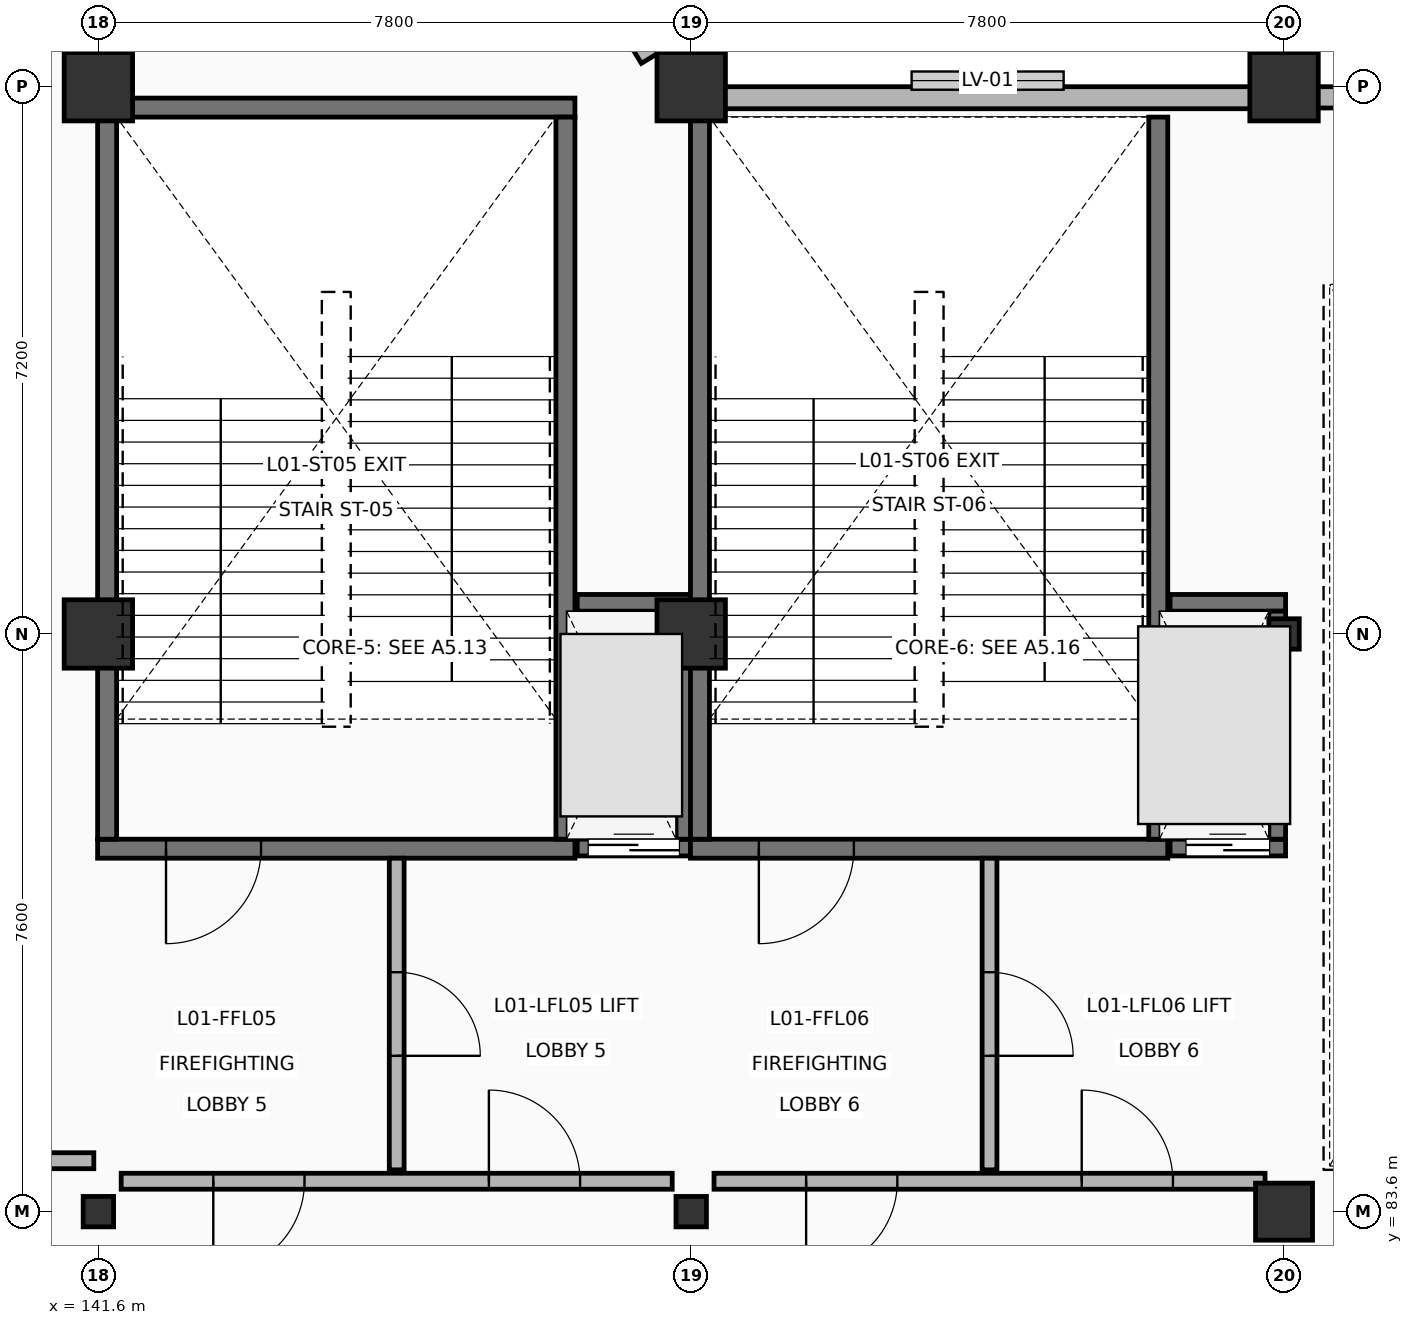
"""IFC4 building model, lengths in metres.
Left out: names, types, materials, properties, quantities, classifications, styles, units other than length and angle.
Written with IfcOpenShell. Run it as: python <this file> out.ifc"""

import sys

from ifc_helpers import new_model, si_unit, direction, frame, frame_2d, origin, origin_2d, place, context, subcontext, project, spatial, rectangle, hollow_rectangle, circle, extrude, element, fill, save


model = new_model("IFC4")
c1 = context("Model", 3, precision=1e-05, world=origin(), true_north=direction((0.0, 1.0)))
c2 = subcontext(c1, "Body", "Model", "MODEL_VIEW")
j1 = project(units=[si_unit("LENGTHUNIT", "METRE"), si_unit("PLANEANGLEUNIT", "RADIAN")], contexts=[c1])
p1 = place(None, origin())
s1 = spatial("IfcSite", under=j1, at=p1, CompositionType="ELEMENT")
p2 = place(p1, origin())
s2 = spatial("IfcBuilding", under=s1, at=p2, CompositionType="ELEMENT")
p3 = place(p2, origin())
s3 = spatial("IfcBuildingStorey", under=s2, at=p3, CompositionType="ELEMENT", Elevation=0.0)
p4 = place(p3, frame((141.6, 83.6, 0.0), z_axis=(0.0, 0.0, 1.0), x_axis=(1.0, 0.0, 0.0)))
e1 = element("IfcColumn", 1, at=p4, inside=s3, PredefinedType="COLUMN", context=c2, shape_type="SweptSolid", body=[
    extrude(hollow_rectangle(XDim=0.4, YDim=0.4, WallThickness=0.016, at=origin_2d()), origin(), (0.0, 0.0, 1.0), 5.4),
])
for number, where, z_axis, x_axis in (
    (2, (141.6, 91.2, 0.0), (0.0, 0.0, 1.0), (1.0, 0.0, 0.0)),
    (3, (141.6, 98.4, 0.0), (0.0, 0.0, 1.0), (1.0, 0.0, 0.0)),
):
    element("IfcColumn", number, at=place(p3, frame(where, z_axis=z_axis, x_axis=x_axis)), inside=s3, PredefinedType="COLUMN", context=c2, shape_type="SweptSolid", body=[
        extrude(rectangle(XDim=0.9, YDim=0.9, at=origin_2d()), origin(), (0.0, 0.0, 1.0), 5.4),
    ])
p5 = place(p3, frame((149.4, 83.6, 0.0), z_axis=(0.0, 0.0, 1.0), x_axis=(1.0, 0.0, 0.0)))
e4 = element("IfcColumn", 4, at=p5, inside=s3, PredefinedType="COLUMN", context=c2, shape_type="SweptSolid", body=[
    extrude(hollow_rectangle(XDim=0.4, YDim=0.4, WallThickness=0.016, at=origin_2d()), origin(), (0.0, 0.0, 1.0), 5.4),
])
for number, where, z_axis, x_axis in (
    (5, (149.4, 91.2, 0.0), (0.0, 0.0, 1.0), (1.0, 0.0, 0.0)),
    (6, (149.4, 98.4, 0.0), (0.0, 0.0, 1.0), (1.0, 0.0, 0.0)),
):
    element("IfcColumn", number, at=place(p3, frame(where, z_axis=z_axis, x_axis=x_axis)), inside=s3, PredefinedType="COLUMN", context=c2, shape_type="SweptSolid", body=[
        extrude(rectangle(XDim=0.9, YDim=0.9, at=origin_2d()), origin(), (0.0, 0.0, 1.0), 5.4),
    ])
p6 = place(p3, frame((157.2, 83.6, 0.0), z_axis=(0.0, 0.0, 1.0), x_axis=(1.0, 0.0, 0.0)))
e7 = element("IfcColumn", 7, at=p6, inside=s3, PredefinedType="COLUMN", context=c2, shape_type="SweptSolid", body=[
    extrude(circle(Radius=0.375, at=origin_2d()), origin(), (0.0, 0.0, 1.0), 5.4),
])
p7 = place(p3, frame((157.2, 91.2, 0.0), z_axis=(0.0, 0.0, 1.0), x_axis=(1.0, 0.0, 0.0)))
e8 = element("IfcColumn", 8, at=p7, inside=s3, PredefinedType="COLUMN", context=c2, shape_type="SweptSolid", body=[
    extrude(hollow_rectangle(XDim=0.4, YDim=0.4, WallThickness=0.016, at=origin_2d()), origin(), (0.0, 0.0, 1.0), 5.4),
])
p8 = place(p3, frame((157.2, 98.4, 0.0), z_axis=(0.0, 0.0, 1.0), x_axis=(1.0, 0.0, 0.0)))
e9 = element("IfcColumn", 9, at=p8, inside=s3, PredefinedType="COLUMN", context=c2, shape_type="SweptSolid", body=[
    extrude(rectangle(XDim=0.9, YDim=0.9, at=origin_2d()), origin(), (0.0, 0.0, 1.0), 5.4),
])
p9 = place(p3, frame((149.835, 98.255, 0.0), z_axis=(0.0, 0.0, 1.0), x_axis=(1.0, 0.0, 0.0)))
e10 = element("IfcWall", 10, at=p9, inside=s3, PredefinedType="SOLIDWALL", context=c2, shape_type="SweptSolid", body=[
    extrude(rectangle(XDim=6.93, YDim=0.29, at=frame_2d((3.465, 0.0))), origin(), (0.0, 0.0, 1.0), 4.325),
])
p10 = place(p3, frame((157.635, 98.26, 0.0), z_axis=(0.0, 0.0, 1.0), x_axis=(1.0, 0.0, 0.0)))
e11 = element("IfcWall", 11, at=p10, inside=s3, PredefinedType="SOLIDWALL", context=c2, shape_type="SweptSolid", body=[
    extrude(rectangle(XDim=7.725, YDim=0.28, at=frame_2d((3.863, 0.0))), origin(), (0.0, 0.0, 1.0), 5.16),
])
p11 = place(p10, frame((0.813, 0.0, 0.0)))
e12 = element("IfcOpeningElement", 12, at=p11, cuts=e11, PredefinedType="OPENING", context=c2, shape_type="SweptSolid", body=[
    extrude(rectangle(XDim=6.1, YDim=3.2, at=frame_2d((3.05, 1.6))), frame((0.0, 0.15, 0.0), z_axis=(0.0, -1.0, 0.0), x_axis=(1.0, 0.0, 0.0)), (0.0, 0.0, 1.0), 0.3),
])
p12 = place(p3, frame((145.319, 104.713, 0.0), z_axis=(0.0, 0.0, 1.0), x_axis=(0.520317846081, -0.853972680505, 0.0)))
e13 = element("IfcWall", 13, at=p12, inside=s3, PredefinedType="SOLIDWALL", context=c2, shape_type="SweptSolid", body=[
    extrude(rectangle(XDim=6.911, YDim=0.4, at=frame_2d((3.456, 0.0))), origin(), (0.0, 0.0, 1.0), 5.1),
])
p13 = place(p3, frame((141.59, 88.375, 0.0), z_axis=(0.0, 0.0, 1.0), x_axis=(1.0, 0.0, 0.0)))
e14 = element("IfcWall", 14, at=p13, inside=s3, PredefinedType="SHEAR", context=c2, shape_type="SweptSolid", body=[
    extrude(rectangle(XDim=6.28, YDim=0.25, at=frame_2d((3.14, 0.0))), origin(), (0.0, 0.0, 1.0), 5.1),
])
p14 = place(p13, frame((0.9, 0.0, 0.0)))
e15 = element("IfcOpeningElement", 15, at=p14, cuts=e14, PredefinedType="OPENING", context=c2, shape_type="SweptSolid", body=[
    extrude(rectangle(XDim=1.25, YDim=2.2, at=frame_2d((0.625, 1.1))), frame((0.0, 0.135, 0.0), z_axis=(0.0, -1.0, 0.0), x_axis=(1.0, 0.0, 0.0)), (0.0, 0.0, 1.0), 0.27),
])
p15 = place(p3, frame((141.59, 98.125, 0.0), z_axis=(0.0, 0.0, 1.0), x_axis=(1.0, 0.0, 0.0)))
e16 = element("IfcWall", 16, at=p15, inside=s3, PredefinedType="SHEAR", context=c2, shape_type="SweptSolid", body=[
    extrude(rectangle(XDim=6.28, YDim=0.25, at=frame_2d((3.14, 0.0))), origin(), (0.0, 0.0, 1.0), 5.1),
])
for number, where, z_axis, x_axis in (
    (17, (141.715, 88.5, 0.0), (0.0, 0.0, 1.0), (0.0, 1.0, 0.0)),
    (18, (147.745, 88.5, 0.0), (0.0, 0.0, 1.0), (0.0, 1.0, 0.0)),
):
    element("IfcWall", number, at=place(p3, frame(where, z_axis=z_axis, x_axis=x_axis)), inside=s3, PredefinedType="SHEAR", context=c2, shape_type="SweptSolid", body=[
        extrude(rectangle(XDim=9.5, YDim=0.25, at=frame_2d((4.75, 0.0))), origin(), (0.0, 0.0, 1.0), 5.1),
    ])
p16 = place(p3, frame((147.9, 88.39, 0.0), z_axis=(0.0, 0.0, 1.0), x_axis=(1.0, 0.0, 0.0)))
e19 = element("IfcWall", 19, at=p16, inside=s3, PredefinedType="SHEAR", context=c2, shape_type="SweptSolid", body=[
    extrude(rectangle(XDim=1.49, YDim=0.22, at=frame_2d((0.745, 0.0))), origin(), (0.0, 0.0, 1.0), 5.1),
])
p17 = place(p16, frame((0.145, 0.0, 0.0)))
e20 = element("IfcOpeningElement", 20, at=p17, cuts=e19, PredefinedType="OPENING", context=c2, shape_type="SweptSolid", body=[
    extrude(rectangle(XDim=1.2, YDim=2.2, at=frame_2d((0.6, 1.1))), frame((0.0, 0.12, 0.0), z_axis=(0.0, -1.0, 0.0), x_axis=(1.0, 0.0, 0.0)), (0.0, 0.0, 1.0), 0.24),
])
p18 = place(p3, frame((147.9, 91.61, 0.0), z_axis=(0.0, 0.0, 1.0), x_axis=(1.0, 0.0, 0.0)))
e21 = element("IfcWall", 21, at=p18, inside=s3, PredefinedType="SHEAR", context=c2, shape_type="SweptSolid", body=[
    extrude(rectangle(XDim=1.49, YDim=0.22, at=frame_2d((0.745, 0.0))), origin(), (0.0, 0.0, 1.0), 5.1),
])
p19 = place(p3, frame((149.31, 88.5, 0.0), z_axis=(0.0, 0.0, 1.0), x_axis=(0.0, 1.0, 0.0)))
e22 = element("IfcWall", 22, at=p19, inside=s3, PredefinedType="SHEAR", context=c2, shape_type="SweptSolid", body=[
    extrude(rectangle(XDim=3.0, YDim=0.22, at=frame_2d((1.5, 0.0))), origin(), (0.0, 0.0, 1.0), 5.1),
])
p20 = place(p3, frame((141.9, 84.0, 0.0), z_axis=(0.0, 0.0, 1.0), x_axis=(1.0, 0.0, 0.0)))
e23 = element("IfcWall", 23, at=p20, inside=s3, PredefinedType="PARTITIONING", context=c2, shape_type="SweptSolid", body=[
    extrude(rectangle(XDim=7.25, YDim=0.21, at=frame_2d((3.625, 0.0))), origin(), (0.0, 0.0, 1.0), 5.1),
])
p21 = place(p20, frame((1.212, 0.0, 0.0)))
e24 = element("IfcOpeningElement", 24, at=p21, cuts=e23, PredefinedType="OPENING", context=c2, shape_type="SweptSolid", body=[
    extrude(rectangle(XDim=1.2, YDim=2.2, at=frame_2d((0.6, 1.1))), frame((0.0, 0.115, 0.0), z_axis=(0.0, -1.0, 0.0), x_axis=(1.0, 0.0, 0.0)), (0.0, 0.0, 1.0), 0.23),
])
p22 = place(p20, frame((4.838, 0.0, 0.0)))
e25 = element("IfcOpeningElement", 25, at=p22, cuts=e23, PredefinedType="OPENING", context=c2, shape_type="SweptSolid", body=[
    extrude(rectangle(XDim=1.2, YDim=2.2, at=frame_2d((0.6, 1.1))), frame((0.0, 0.115, 0.0), z_axis=(0.0, -1.0, 0.0), x_axis=(1.0, 0.0, 0.0)), (0.0, 0.0, 1.0), 0.23),
])
p23 = place(p3, frame((145.525, 84.15, 0.0), z_axis=(0.0, 0.0, 1.0), x_axis=(0.0, 1.0, 0.0)))
e26 = element("IfcWall", 26, at=p23, inside=s3, PredefinedType="PARTITIONING", context=c2, shape_type="SweptSolid", body=[
    extrude(rectangle(XDim=4.1, YDim=0.195, at=frame_2d((2.05, 0.0))), origin(), (0.0, 0.0, 1.0), 5.1),
])
p24 = place(p23, frame((1.5, 0.0, 0.0)))
e27 = element("IfcOpeningElement", 27, at=p24, cuts=e26, PredefinedType="OPENING", context=c2, shape_type="SweptSolid", body=[
    extrude(rectangle(XDim=1.1, YDim=2.15, at=frame_2d((0.55, 1.075))), frame((0.0, 0.107, 0.0), z_axis=(0.0, -1.0, 0.0), x_axis=(1.0, 0.0, 0.0)), (0.0, 0.0, 1.0), 0.215),
])
p25 = place(p3, frame((149.39, 88.375, 0.0), z_axis=(0.0, 0.0, 1.0), x_axis=(1.0, 0.0, 0.0)))
e28 = element("IfcWall", 28, at=p25, inside=s3, PredefinedType="SHEAR", context=c2, shape_type="SweptSolid", body=[
    extrude(rectangle(XDim=6.28, YDim=0.25, at=frame_2d((3.14, 0.0))), origin(), (0.0, 0.0, 1.0), 5.1),
])
p26 = place(p25, frame((0.9, 0.0, 0.0)))
e29 = element("IfcOpeningElement", 29, at=p26, cuts=e28, PredefinedType="OPENING", context=c2, shape_type="SweptSolid", body=[
    extrude(rectangle(XDim=1.25, YDim=2.2, at=frame_2d((0.625, 1.1))), frame((0.0, 0.135, 0.0), z_axis=(0.0, -1.0, 0.0), x_axis=(1.0, 0.0, 0.0)), (0.0, 0.0, 1.0), 0.27),
])
for number, where, z_axis, x_axis in (
    (30, (149.515, 88.5, 0.0), (0.0, 0.0, 1.0), (0.0, 1.0, 0.0)),
    (31, (155.545, 88.5, 0.0), (0.0, 0.0, 1.0), (0.0, 1.0, 0.0)),
):
    element("IfcWall", number, at=place(p3, frame(where, z_axis=z_axis, x_axis=x_axis)), inside=s3, PredefinedType="SHEAR", context=c2, shape_type="SweptSolid", body=[
        extrude(rectangle(XDim=9.5, YDim=0.25, at=frame_2d((4.75, 0.0))), origin(), (0.0, 0.0, 1.0), 5.1),
    ])
p27 = place(p3, frame((155.7, 88.39, 0.0), z_axis=(0.0, 0.0, 1.0), x_axis=(1.0, 0.0, 0.0)))
e32 = element("IfcWall", 32, at=p27, inside=s3, PredefinedType="SHEAR", context=c2, shape_type="SweptSolid", body=[
    extrude(rectangle(XDim=1.52, YDim=0.22, at=frame_2d((0.76, 0.0))), origin(), (0.0, 0.0, 1.0), 5.1),
])
p28 = place(p27, frame((0.21, 0.0, 0.0)))
e33 = element("IfcOpeningElement", 33, at=p28, cuts=e32, PredefinedType="OPENING", context=c2, shape_type="SweptSolid", body=[
    extrude(rectangle(XDim=1.1, YDim=2.15, at=frame_2d((0.55, 1.075))), frame((0.0, 0.12, 0.0), z_axis=(0.0, -1.0, 0.0), x_axis=(1.0, 0.0, 0.0)), (0.0, 0.0, 1.0), 0.24),
])
p29 = place(p3, frame((155.7, 91.61, 0.0), z_axis=(0.0, 0.0, 1.0), x_axis=(1.0, 0.0, 0.0)))
e34 = element("IfcWall", 34, at=p29, inside=s3, PredefinedType="SHEAR", context=c2, shape_type="SweptSolid", body=[
    extrude(rectangle(XDim=1.52, YDim=0.22, at=frame_2d((0.76, 0.0))), origin(), (0.0, 0.0, 1.0), 5.1),
])
p30 = place(p3, frame((157.11, 88.5, 0.0), z_axis=(0.0, 0.0, 1.0), x_axis=(0.0, 1.0, 0.0)))
e35 = element("IfcWall", 35, at=p30, inside=s3, PredefinedType="SHEAR", context=c2, shape_type="SweptSolid", body=[
    extrude(rectangle(XDim=3.0, YDim=0.22, at=frame_2d((1.5, 0.0))), origin(), (0.0, 0.0, 1.0), 5.1),
])
p31 = place(p3, frame((149.7, 84.0, 0.0), z_axis=(0.0, 0.0, 1.0), x_axis=(1.0, 0.0, 0.0)))
e36 = element("IfcWall", 36, at=p31, inside=s3, PredefinedType="PARTITIONING", context=c2, shape_type="SweptSolid", body=[
    extrude(rectangle(XDim=7.25, YDim=0.21, at=frame_2d((3.625, 0.0))), origin(), (0.0, 0.0, 1.0), 5.1),
])
p32 = place(p31, frame((1.212, 0.0, 0.0)))
e37 = element("IfcOpeningElement", 37, at=p32, cuts=e36, PredefinedType="OPENING", context=c2, shape_type="SweptSolid", body=[
    extrude(rectangle(XDim=1.2, YDim=2.2, at=frame_2d((0.6, 1.1))), frame((0.0, 0.115, 0.0), z_axis=(0.0, -1.0, 0.0), x_axis=(1.0, 0.0, 0.0)), (0.0, 0.0, 1.0), 0.23),
])
p33 = place(p31, frame((4.838, 0.0, 0.0)))
e38 = element("IfcOpeningElement", 38, at=p33, cuts=e36, PredefinedType="OPENING", context=c2, shape_type="SweptSolid", body=[
    extrude(rectangle(XDim=1.2, YDim=2.2, at=frame_2d((0.6, 1.1))), frame((0.0, 0.115, 0.0), z_axis=(0.0, -1.0, 0.0), x_axis=(1.0, 0.0, 0.0)), (0.0, 0.0, 1.0), 0.23),
])
p34 = place(p3, frame((153.325, 84.15, 0.0), z_axis=(0.0, 0.0, 1.0), x_axis=(0.0, 1.0, 0.0)))
e39 = element("IfcWall", 39, at=p34, inside=s3, PredefinedType="PARTITIONING", context=c2, shape_type="SweptSolid", body=[
    extrude(rectangle(XDim=4.1, YDim=0.195, at=frame_2d((2.05, 0.0))), origin(), (0.0, 0.0, 1.0), 5.1),
])
p35 = place(p34, frame((1.5, 0.0, 0.0)))
e40 = element("IfcOpeningElement", 40, at=p35, cuts=e39, PredefinedType="OPENING", context=c2, shape_type="SweptSolid", body=[
    extrude(rectangle(XDim=1.1, YDim=2.15, at=frame_2d((0.55, 1.075))), frame((0.0, 0.107, 0.0), z_axis=(0.0, -1.0, 0.0), x_axis=(1.0, 0.0, 0.0)), (0.0, 0.0, 1.0), 0.215),
])
p36 = place(p3, frame((126.372, 84.27, 0.0), z_axis=(0.0, 0.0, 1.0), x_axis=(1.0, 0.0, 0.0)))
e41 = element("IfcWall", 41, at=p36, inside=s3, PredefinedType="PARTITIONING", context=c2, shape_type="SweptSolid", body=[
    extrude(rectangle(XDim=15.168, YDim=0.21, at=frame_2d((7.584, 0.0))), origin(), (0.0, 0.0, 1.0), 4.402),
])
p37 = place(p36, frame((4.207, 0.0, 0.0)))
e42 = element("IfcOpeningElement", 42, at=p37, cuts=e41, PredefinedType="OPENING", context=c2, shape_type="SweptSolid", body=[
    extrude(rectangle(XDim=1.9, YDim=2.4, at=frame_2d((0.95, 1.2))), frame((0.0, 0.115, 0.0), z_axis=(0.0, -1.0, 0.0), x_axis=(1.0, 0.0, 0.0)), (0.0, 0.0, 1.0), 0.23),
])
p38 = place(p14, origin())
e43 = element("IfcDoor", 43, at=p38, inside=s3, OperationType="SINGLE_SWING_RIGHT", PredefinedType="DOOR", context=c2, shape_type="SweptSolid", body=[
    extrude(rectangle(XDim=1.25, YDim=2.2, at=frame_2d((0.625, 1.1))), frame((0.0, 0.025, 0.0), z_axis=(0.0, -1.0, 0.0), x_axis=(1.0, 0.0, 0.0)), (0.0, 0.0, 1.0), 0.05),
])
fill(e15, e43)
p39 = place(p17, origin())
e44 = element("IfcDoor", 44, at=p39, inside=s3, OperationType="DOUBLE_DOOR_SLIDING", PredefinedType="DOOR", context=c2, shape_type="SweptSolid", body=[
    extrude(rectangle(XDim=1.2, YDim=2.2, at=frame_2d((0.6, 1.1))), frame((0.0, 0.025, 0.0), z_axis=(0.0, -1.0, 0.0), x_axis=(1.0, 0.0, 0.0)), (0.0, 0.0, 1.0), 0.05),
])
fill(e20, e44)
p40 = place(p21, origin())
e45 = element("IfcDoor", 45, at=p40, inside=s3, OperationType="SINGLE_SWING_RIGHT", PredefinedType="DOOR", context=c2, shape_type="SweptSolid", body=[
    extrude(rectangle(XDim=1.2, YDim=2.2, at=frame_2d((0.6, 1.1))), frame((0.0, 0.025, 0.0), z_axis=(0.0, -1.0, 0.0), x_axis=(1.0, 0.0, 0.0)), (0.0, 0.0, 1.0), 0.05),
])
fill(e24, e45)
p41 = place(p22, origin())
e46 = element("IfcDoor", 46, at=p41, inside=s3, OperationType="SINGLE_SWING_LEFT", PredefinedType="DOOR", context=c2, shape_type="SweptSolid", body=[
    extrude(rectangle(XDim=1.2, YDim=2.2, at=frame_2d((0.6, 1.1))), frame((0.0, 0.025, 0.0), z_axis=(0.0, -1.0, 0.0), x_axis=(1.0, 0.0, 0.0)), (0.0, 0.0, 1.0), 0.05),
])
fill(e25, e46)
p42 = place(p24, origin())
e47 = element("IfcDoor", 47, at=p42, inside=s3, OperationType="SINGLE_SWING_RIGHT", PredefinedType="DOOR", context=c2, shape_type="SweptSolid", body=[
    extrude(rectangle(XDim=1.1, YDim=2.15, at=frame_2d((0.55, 1.075))), frame((0.0, 0.025, 0.0), z_axis=(0.0, -1.0, 0.0), x_axis=(1.0, 0.0, 0.0)), (0.0, 0.0, 1.0), 0.05),
])
fill(e27, e47)
p43 = place(p26, origin())
e48 = element("IfcDoor", 48, at=p43, inside=s3, OperationType="SINGLE_SWING_RIGHT", PredefinedType="DOOR", context=c2, shape_type="SweptSolid", body=[
    extrude(rectangle(XDim=1.25, YDim=2.2, at=frame_2d((0.625, 1.1))), frame((0.0, 0.025, 0.0), z_axis=(0.0, -1.0, 0.0), x_axis=(1.0, 0.0, 0.0)), (0.0, 0.0, 1.0), 0.05),
])
fill(e29, e48)
p44 = place(p28, origin())
e49 = element("IfcDoor", 49, at=p44, inside=s3, OperationType="DOUBLE_DOOR_SLIDING", PredefinedType="DOOR", context=c2, shape_type="SweptSolid", body=[
    extrude(rectangle(XDim=1.1, YDim=2.15, at=frame_2d((0.55, 1.075))), frame((0.0, 0.025, 0.0), z_axis=(0.0, -1.0, 0.0), x_axis=(1.0, 0.0, 0.0)), (0.0, 0.0, 1.0), 0.05),
])
fill(e33, e49)
p45 = place(p32, origin())
e50 = element("IfcDoor", 50, at=p45, inside=s3, OperationType="SINGLE_SWING_RIGHT", PredefinedType="DOOR", context=c2, shape_type="SweptSolid", body=[
    extrude(rectangle(XDim=1.2, YDim=2.2, at=frame_2d((0.6, 1.1))), frame((0.0, 0.025, 0.0), z_axis=(0.0, -1.0, 0.0), x_axis=(1.0, 0.0, 0.0)), (0.0, 0.0, 1.0), 0.05),
])
fill(e37, e50)
p46 = place(p33, origin())
e51 = element("IfcDoor", 51, at=p46, inside=s3, OperationType="SINGLE_SWING_LEFT", PredefinedType="DOOR", context=c2, shape_type="SweptSolid", body=[
    extrude(rectangle(XDim=1.2, YDim=2.2, at=frame_2d((0.6, 1.1))), frame((0.0, 0.025, 0.0), z_axis=(0.0, -1.0, 0.0), x_axis=(1.0, 0.0, 0.0)), (0.0, 0.0, 1.0), 0.05),
])
fill(e38, e51)
p47 = place(p35, origin())
e52 = element("IfcDoor", 52, at=p47, inside=s3, OperationType="SINGLE_SWING_RIGHT", PredefinedType="DOOR", context=c2, shape_type="SweptSolid", body=[
    extrude(rectangle(XDim=1.1, YDim=2.15, at=frame_2d((0.55, 1.075))), frame((0.0, 0.025, 0.0), z_axis=(0.0, -1.0, 0.0), x_axis=(1.0, 0.0, 0.0)), (0.0, 0.0, 1.0), 0.05),
])
fill(e40, e52)
save(model, sys.argv[1])
